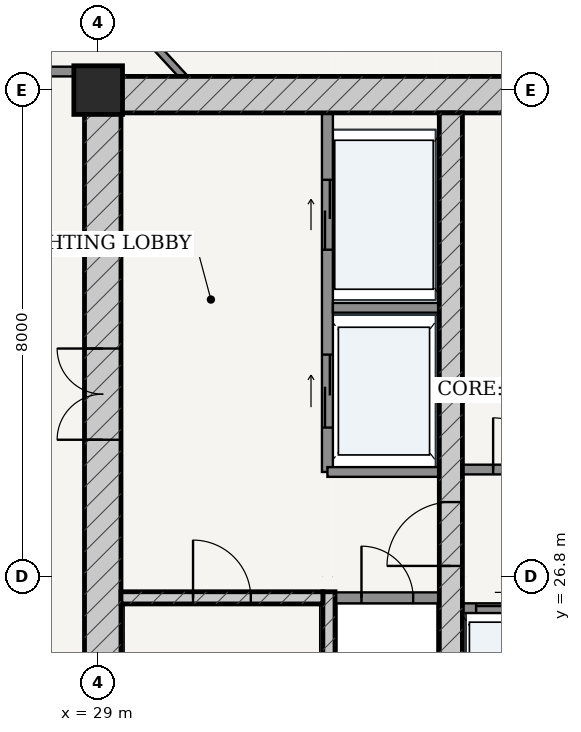
"""IFC4 building model, lengths in metres.
Left out: names, types, materials, properties, quantities, classifications, styles, units other than length and angle.
Written with IfcOpenShell. Run it as: python <this file> out.ifc"""

import sys

from ifc_helpers import new_model, si_unit, direction, frame, frame_2d, origin, origin_2d, place, context, subcontext, project, spatial, rectangle, extrude, source, transform, mapped, element, fill, save


model = new_model("IFC4")
c1 = context("Model", 3, precision=1e-05, world=origin(), true_north=direction((-0.2419218956, 0.970295726276)))
c2 = subcontext(c1, "Body", "Model", "MODEL_VIEW")
j1 = project(units=[si_unit("LENGTHUNIT", "METRE"), si_unit("PLANEANGLEUNIT", "RADIAN")], contexts=[c1])
p1 = place(None, origin())
s1 = spatial("IfcSite", under=j1, at=p1, CompositionType="ELEMENT")
p2 = place(p1, origin())
s2 = spatial("IfcBuilding", under=s1, at=p2, CompositionType="ELEMENT")
p3 = place(p2, frame((0.0, 0.0, 213.4)))
s3 = spatial("IfcBuildingStorey", under=s2, at=p3, CompositionType="ELEMENT", Elevation=213.4)
p4 = place(p3, frame((29.0, 34.8, 0.0), z_axis=(0.0, 0.0, 1.0), x_axis=(1.0, 0.0, 0.0)))
e1 = element("IfcColumn", 1, at=p4, inside=s3, PredefinedType="COLUMN", context=c2, shape_type="SweptSolid", body=[
    extrude(rectangle(XDim=0.8, YDim=0.8, at=origin_2d()), origin(), (0.0, 0.0, 1.0), 3.7),
])
p5 = place(p3, frame((28.775, 34.725, 0.0), z_axis=(0.0, 0.0, 1.0), x_axis=(1.0, 0.0, 0.0)))
e2 = element("IfcWall", 2, at=p5, inside=s3, PredefinedType="SHEAR", context=c2, shape_type="SweptSolid", body=[
    extrude(rectangle(XDim=18.45, YDim=0.6, at=frame_2d((9.225, 0.0))), origin(), (0.0, 0.0, 1.0), 3.435),
])
p6 = place(p3, frame((29.075, 19.175, 0.0), z_axis=(0.0, 0.0, 1.0), x_axis=(0.0, 1.0, 0.0)))
e3 = element("IfcWall", 3, at=p6, inside=s3, PredefinedType="SHEAR", context=c2, shape_type="SweptSolid", body=[
    extrude(rectangle(XDim=15.25, YDim=0.6, at=frame_2d((7.625, 0.0))), origin(), (0.0, 0.0, 1.0), 3.435),
])
p7 = place(p6, frame((9.875, 0.0, 0.0)))
e4 = element("IfcOpeningElement", 4, at=p7, cuts=e3, PredefinedType="OPENING", context=c2, shape_type="SweptSolid", body=[
    extrude(rectangle(XDim=1.5, YDim=2.2, at=frame_2d((0.75, 1.1))), frame((0.0, 0.31, 0.0), z_axis=(0.0, -1.0, 0.0), x_axis=(1.0, 0.0, 0.0)), (0.0, 0.0, 1.0), 0.62),
])
p8 = place(p3, frame((32.795, 19.175, 0.0), z_axis=(0.0, 0.0, 1.0), x_axis=(0.0, 1.0, 0.0)))
e5 = element("IfcWall", 5, at=p8, inside=s3, PredefinedType="SOLIDWALL", context=c2, shape_type="SweptSolid", body=[
    extrude(rectangle(XDim=7.375, YDim=0.2, at=frame_2d((3.688, 0.0))), origin(), (0.0, 0.0, 1.0), 3.435),
])
p9 = place(p3, frame((29.375, 26.45, 0.0), z_axis=(0.0, 0.0, 1.0), x_axis=(1.0, 0.0, 0.0)))
e6 = element("IfcWall", 6, at=p9, inside=s3, PredefinedType="SOLIDWALL", context=c2, shape_type="SweptSolid", body=[
    extrude(rectangle(XDim=3.32, YDim=0.2, at=frame_2d((1.66, 0.0))), origin(), (0.0, 0.0, 1.0), 3.435),
])
p10 = place(p9, frame((1.185, 0.0, 0.0)))
e7 = element("IfcOpeningElement", 7, at=p10, cuts=e6, PredefinedType="OPENING", context=c2, shape_type="SweptSolid", body=[
    extrude(rectangle(XDim=0.95, YDim=2.15, at=frame_2d((0.475, 1.075))), frame((0.0, 0.11, 0.0), z_axis=(0.0, -1.0, 0.0), x_axis=(1.0, 0.0, 0.0)), (0.0, 0.0, 1.0), 0.22),
])
p11 = place(p3, frame((34.8, 19.175, 0.0), z_axis=(0.0, 0.0, 1.0), x_axis=(0.0, 1.0, 0.0)))
e8 = element("IfcWall", 8, at=p11, inside=s3, PredefinedType="SHEAR", context=c2, shape_type="SweptSolid", body=[
    extrude(rectangle(XDim=15.25, YDim=0.38, at=frame_2d((7.625, 0.0))), origin(), (0.0, 0.0, 1.0), 3.435),
])
p12 = place(p11, frame((7.8, 0.0, 0.0)))
e9 = element("IfcOpeningElement", 9, at=p12, cuts=e8, PredefinedType="OPENING", context=c2, shape_type="SweptSolid", body=[
    extrude(rectangle(XDim=1.05, YDim=2.15, at=frame_2d((0.525, 1.075))), frame((0.0, 0.2, 0.0), z_axis=(0.0, -1.0, 0.0), x_axis=(1.0, 0.0, 0.0)), (0.0, 0.0, 1.0), 0.4),
])
p13 = place(p3, frame((32.9, 26.45, 0.0), z_axis=(0.0, 0.0, 1.0), x_axis=(1.0, 0.0, 0.0)))
e10 = element("IfcWall", 10, at=p13, inside=s3, PredefinedType="PARTITIONING", context=c2, shape_type="SweptSolid", body=[
    extrude(rectangle(XDim=1.71, YDim=0.18, at=frame_2d((0.855, 0.0))), origin(), (0.0, 0.0, 1.0), 3.435),
])
p14 = place(p13, frame((0.43, 0.0, 0.0)))
e11 = element("IfcOpeningElement", 11, at=p14, cuts=e10, PredefinedType="OPENING", context=c2, shape_type="SweptSolid", body=[
    extrude(rectangle(XDim=0.85, YDim=2.1, at=frame_2d((0.425, 1.05))), frame((0.0, 0.1, 0.0), z_axis=(0.0, -1.0, 0.0), x_axis=(1.0, 0.0, 0.0)), (0.0, 0.0, 1.0), 0.2),
])
p15 = place(p3, frame((32.77, 28.52, 0.0), z_axis=(0.0, 0.0, 1.0), x_axis=(0.0, 1.0, 0.0)))
e12 = element("IfcWall", 12, at=p15, inside=s3, PredefinedType="PARTITIONING", context=c2, shape_type="SweptSolid", body=[
    extrude(rectangle(XDim=5.905, YDim=0.18, at=frame_2d((2.953, 0.0))), origin(), (0.0, 0.0, 1.0), 3.435),
])
p16 = place(p15, frame((3.655, 0.0, 0.0)))
e13 = element("IfcOpeningElement", 13, at=p16, cuts=e12, PredefinedType="OPENING", context=c2, shape_type="SweptSolid", body=[
    extrude(rectangle(XDim=1.15, YDim=2.2, at=frame_2d((0.575, 1.1))), frame((0.0, 0.1, 0.0), z_axis=(0.0, -1.0, 0.0), x_axis=(1.0, 0.0, 0.0)), (0.0, 0.0, 1.0), 0.2),
])
p17 = place(p15, frame((0.73, 0.0, 0.0)))
e14 = element("IfcOpeningElement", 14, at=p17, cuts=e12, PredefinedType="OPENING", context=c2, shape_type="SweptSolid", body=[
    extrude(rectangle(XDim=1.2, YDim=2.25, at=frame_2d((0.6, 1.125))), frame((0.0, 0.1, 0.0), z_axis=(0.0, -1.0, 0.0), x_axis=(1.0, 0.0, 0.0)), (0.0, 0.0, 1.0), 0.2),
])
p18 = place(p3, frame((32.86, 31.22, 0.0), z_axis=(0.0, 0.0, 1.0), x_axis=(1.0, 0.0, 0.0)))
e15 = element("IfcWall", 15, at=p18, inside=s3, PredefinedType="PARTITIONING", context=c2, shape_type="SweptSolid", body=[
    extrude(rectangle(XDim=1.75, YDim=0.16, at=frame_2d((0.875, 0.0))), origin(), (0.0, 0.0, 1.0), 3.435),
])
p19 = place(p3, frame((32.77, 28.52, 0.0), z_axis=(0.0, 0.0, 1.0), x_axis=(1.0, 0.0, 0.0)))
e16 = element("IfcWall", 16, at=p19, inside=s3, PredefinedType="PARTITIONING", context=c2, shape_type="SweptSolid", body=[
    extrude(rectangle(XDim=1.84, YDim=0.16, at=frame_2d((0.92, 0.0))), origin(), (0.0, 0.0, 1.0), 3.435),
])
p20 = place(p3, frame((34.99, 28.56, 0.0), z_axis=(0.0, 0.0, 1.0), x_axis=(1.0, 0.0, 0.0)))
e17 = element("IfcWall", 17, at=p20, inside=s3, PredefinedType="PARTITIONING", context=c2, shape_type="SweptSolid", body=[
    extrude(rectangle(XDim=6.02, YDim=0.16, at=frame_2d((3.01, 0.0))), origin(), (0.0, 0.0, 1.0), 3.435),
])
p21 = place(p20, frame((0.505, 0.0, 0.0)))
e18 = element("IfcOpeningElement", 18, at=p21, cuts=e17, PredefinedType="OPENING", context=c2, shape_type="SweptSolid", body=[
    extrude(rectangle(XDim=0.85, YDim=2.1, at=frame_2d((0.425, 1.05))), frame((0.0, 0.09, 0.0), z_axis=(0.0, -1.0, 0.0), x_axis=(1.0, 0.0, 0.0)), (0.0, 0.0, 1.0), 0.18),
])
p22 = place(p20, frame((2.58, 0.0, 0.0)))
e19 = element("IfcOpeningElement", 19, at=p22, cuts=e17, PredefinedType="OPENING", context=c2, shape_type="SweptSolid", body=[
    extrude(rectangle(XDim=0.86, YDim=2.1, at=frame_2d((0.43, 1.05))), frame((0.0, 0.09, 0.0), z_axis=(0.0, -1.0, 0.0), x_axis=(1.0, 0.0, 0.0)), (0.0, 0.0, 1.0), 0.18),
])
p23 = place(p20, frame((4.665, 0.0, 0.0)))
e20 = element("IfcOpeningElement", 20, at=p23, cuts=e17, PredefinedType="OPENING", context=c2, shape_type="SweptSolid", body=[
    extrude(rectangle(XDim=0.85, YDim=2.1, at=frame_2d((0.425, 1.05))), frame((0.0, 0.09, 0.0), z_axis=(0.0, -1.0, 0.0), x_axis=(1.0, 0.0, 0.0)), (0.0, 0.0, 1.0), 0.18),
])
p24 = place(p3, frame((34.99, 26.28, 0.0), z_axis=(0.0, 0.0, 1.0), x_axis=(1.0, 0.0, 0.0)))
e21 = element("IfcWall", 21, at=p24, inside=s3, PredefinedType="PARTITIONING", context=c2, shape_type="SweptSolid", body=[
    extrude(rectangle(XDim=6.02, YDim=0.16, at=frame_2d((3.01, 0.0))), origin(), (0.0, 0.0, 1.0), 3.435),
])
p25 = place(p24, frame((0.225, 0.0, 0.0)))
e22 = element("IfcOpeningElement", 22, at=p25, cuts=e21, PredefinedType="OPENING", context=c2, shape_type="SweptSolid", body=[
    extrude(rectangle(XDim=1.1, YDim=2.2, at=frame_2d((0.55, 1.1))), frame((0.0, 0.09, 0.0), z_axis=(0.0, -1.0, 0.0), x_axis=(1.0, 0.0, 0.0)), (0.0, 0.0, 1.0), 0.18),
])
p26 = place(p24, frame((1.705, 0.0, 0.0)))
e23 = element("IfcOpeningElement", 23, at=p26, cuts=e21, PredefinedType="OPENING", context=c2, shape_type="SweptSolid", body=[
    extrude(rectangle(XDim=1.1, YDim=2.2, at=frame_2d((0.55, 1.1))), frame((0.0, 0.09, 0.0), z_axis=(0.0, -1.0, 0.0), x_axis=(1.0, 0.0, 0.0)), (0.0, 0.0, 1.0), 0.18),
])
p27 = place(p3, frame((26.845, 35.105, 0.0), z_axis=(0.0, 0.0, 1.0), x_axis=(1.0, 0.0, 0.0)))
e24 = element("IfcWall", 24, at=p27, inside=s3, PredefinedType="PARTITIONING", context=c2, shape_type="SweptSolid", body=[
    extrude(rectangle(XDim=1.93, YDim=0.16, at=frame_2d((0.965, 0.0))), origin(), (0.0, 0.0, 1.0), 3.435),
])
p28 = place(p3, frame((30.396, 35.026, 0.0), z_axis=(0.0, 0.0, 1.0), x_axis=(-0.678759446058, 0.734360684124, 0.0)))
e25 = element("IfcWall", 25, at=p28, inside=s3, PredefinedType="PARTITIONING", context=c2, shape_type="SweptSolid", body=[
    extrude(rectangle(XDim=3.912, YDim=0.12, at=frame_2d((1.956, 0.0))), origin(), (0.0, 0.0, 1.0), 2.951),
])
m1 = source(origin(), c2, "Body", "SweptSolid", [
    extrude(rectangle(XDim=1.5, YDim=2.2, at=frame_2d((0.75, 1.1))), frame((0.0, 0.025, 0.0), z_axis=(0.0, -1.0, 0.0), x_axis=(1.0, 0.0, 0.0)), (0.0, 0.0, 1.0), 0.05),
])
p29 = place(p7, origin())
e26 = element("IfcDoor", 26, at=p29, inside=s3, OperationType="DOUBLE_DOOR_SINGLE_SWING", PredefinedType="DOOR", context=c2, shape_type="MappedRepresentation", body=[
    mapped(m1, transform((0.0, 0.0, 0.0), scale=1.0)),
])
fill(e4, e26)
m2 = source(origin(), c2, "Body", "SweptSolid", [
    extrude(rectangle(XDim=1.05, YDim=2.15, at=frame_2d((0.525, 1.075))), frame((0.0, 0.025, 0.0), z_axis=(0.0, -1.0, 0.0), x_axis=(1.0, 0.0, 0.0)), (0.0, 0.0, 1.0), 0.05),
])
p30 = place(p12, origin())
e27 = element("IfcDoor", 27, at=p30, inside=s3, OperationType="SINGLE_SWING_LEFT", PredefinedType="DOOR", context=c2, shape_type="MappedRepresentation", body=[
    mapped(m2, transform((0.0, 0.0, 0.0), scale=1.0)),
])
fill(e9, e27)
m3 = source(origin(), c2, "Body", "SweptSolid", [
    extrude(rectangle(XDim=0.95, YDim=2.15, at=frame_2d((0.475, 1.075))), frame((0.0, 0.025, 0.0), z_axis=(0.0, -1.0, 0.0), x_axis=(1.0, 0.0, 0.0)), (0.0, 0.0, 1.0), 0.05),
])
p31 = place(p10, origin())
e28 = element("IfcDoor", 28, at=p31, inside=s3, OperationType="SINGLE_SWING_LEFT", PredefinedType="DOOR", context=c2, shape_type="MappedRepresentation", body=[
    mapped(m3, transform((0.0, 0.0, 0.0), scale=1.0)),
])
fill(e7, e28)
m4 = source(origin(), c2, "Body", "SweptSolid", [
    extrude(rectangle(XDim=0.85, YDim=2.1, at=frame_2d((0.425, 1.05))), frame((0.0, 0.025, 0.0), z_axis=(0.0, -1.0, 0.0), x_axis=(1.0, 0.0, 0.0)), (0.0, 0.0, 1.0), 0.05),
])
p32 = place(p14, origin())
e29 = element("IfcDoor", 29, at=p32, inside=s3, OperationType="SINGLE_SWING_LEFT", PredefinedType="DOOR", context=c2, shape_type="MappedRepresentation", body=[
    mapped(m4, transform((0.0, 0.0, 0.0), scale=1.0)),
])
fill(e11, e29)
p33 = place(p21, origin())
e30 = element("IfcDoor", 30, at=p33, inside=s3, OperationType="SINGLE_SWING_LEFT", PredefinedType="DOOR", context=c2, shape_type="MappedRepresentation", body=[
    mapped(m4, transform((0.0, 0.0, 0.0), scale=1.0)),
])
fill(e18, e30)
m5 = source(origin(), c2, "Body", "SweptSolid", [
    extrude(rectangle(XDim=1.15, YDim=2.2, at=frame_2d((0.575, 1.1))), frame((0.0, 0.025, 0.0), z_axis=(0.0, -1.0, 0.0), x_axis=(1.0, 0.0, 0.0)), (0.0, 0.0, 1.0), 0.05),
])
p34 = place(p16, origin())
e31 = element("IfcDoor", 31, at=p34, inside=s3, OperationType="DOUBLE_DOOR_SLIDING", PredefinedType="DOOR", context=c2, shape_type="MappedRepresentation", body=[
    mapped(m5, transform((0.0, 0.0, 0.0), scale=1.0)),
])
fill(e13, e31)
m6 = source(origin(), c2, "Body", "SweptSolid", [
    extrude(rectangle(XDim=1.2, YDim=2.25, at=frame_2d((0.6, 1.125))), frame((0.0, 0.025, 0.0), z_axis=(0.0, -1.0, 0.0), x_axis=(1.0, 0.0, 0.0)), (0.0, 0.0, 1.0), 0.05),
])
p35 = place(p17, origin())
e32 = element("IfcDoor", 32, at=p35, inside=s3, OperationType="DOUBLE_DOOR_SLIDING", PredefinedType="DOOR", context=c2, shape_type="MappedRepresentation", body=[
    mapped(m6, transform((0.0, 0.0, 0.0), scale=1.0)),
])
fill(e14, e32)
m7 = source(origin(), c2, "Body", "SweptSolid", [
    extrude(rectangle(XDim=1.1, YDim=2.2, at=frame_2d((0.55, 1.1))), frame((0.0, 0.025, 0.0), z_axis=(0.0, -1.0, 0.0), x_axis=(1.0, 0.0, 0.0)), (0.0, 0.0, 1.0), 0.05),
])
p36 = place(p25, origin())
e33 = element("IfcDoor", 33, at=p36, inside=s3, OperationType="DOUBLE_DOOR_SLIDING", PredefinedType="DOOR", context=c2, shape_type="MappedRepresentation", body=[
    mapped(m7, transform((0.0, 0.0, 0.0), scale=1.0)),
])
fill(e22, e33)
save(model, sys.argv[1])
